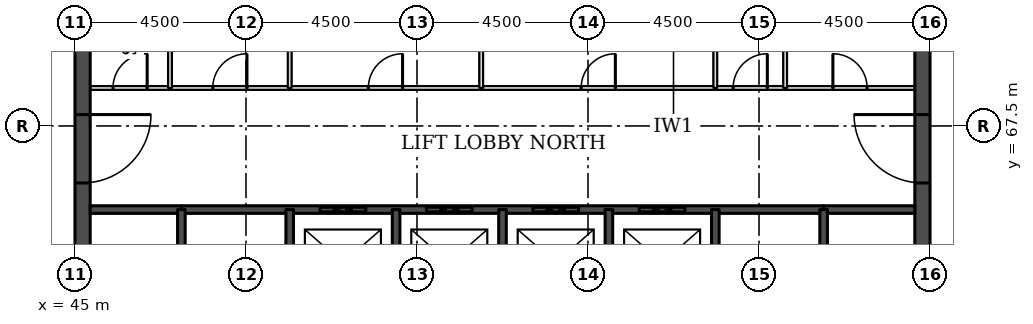
"""IFC4 building model, lengths in metres.
Left out: names, types, materials, properties, quantities, classifications, styles, units other than length and angle.
Written with IfcOpenShell. Run it as: python <this file> out.ifc"""

import sys

from ifc_helpers import new_model, si_unit, direction, frame, frame_2d, origin, place, context, subcontext, project, spatial, rectangle, extrude, element, fill, save


model = new_model("IFC4")
c1 = context("Model", 3, precision=1e-05, world=origin(), true_north=direction((0.0, 1.0)))
c2 = subcontext(c1, "Body", "Model", "MODEL_VIEW")
j1 = project(units=[si_unit("LENGTHUNIT", "METRE"), si_unit("PLANEANGLEUNIT", "RADIAN")], contexts=[c1])
p1 = place(None, origin())
s1 = spatial("IfcSite", under=j1, at=p1, CompositionType="ELEMENT")
p2 = place(p1, origin())
s2 = spatial("IfcBuilding", under=s1, at=p2, CompositionType="ELEMENT")
p3 = place(p2, frame((0.0, 0.0, 237.8)))
s3 = spatial("IfcBuildingStorey", under=s2, at=p3, CompositionType="ELEMENT", Elevation=237.8)
p4 = place(p3, frame((45.2, 49.5, 0.0), z_axis=(0.0, 0.0, 1.0), x_axis=(0.0, 1.0, 0.0)))
e1 = element("IfcWall", 1, at=p4, inside=s3, PredefinedType="SHEAR", context=c2, shape_type="SweptSolid", body=[
    extrude(rectangle(XDim=22.5, YDim=0.4, at=frame_2d((11.25, 0.0))), origin(), (0.0, 0.0, 1.0), 3.7),
])
p5 = place(p4, frame((4.2, 0.0, 0.0)))
e2 = element("IfcOpeningElement", 2, at=p5, cuts=e1, PredefinedType="OPENING", context=c2, shape_type="SweptSolid", body=[
    extrude(rectangle(XDim=1.8, YDim=2.1, at=frame_2d((0.9, 1.05))), frame((0.0, 0.21, 0.0), z_axis=(0.0, -1.0, 0.0), x_axis=(1.0, 0.0, 0.0)), (0.0, 0.0, 1.0), 0.42),
])
p6 = place(p4, frame((6.9, 0.0, 0.0)))
e3 = element("IfcOpeningElement", 3, at=p6, cuts=e1, PredefinedType="OPENING", context=c2, shape_type="SweptSolid", body=[
    extrude(rectangle(XDim=1.1, YDim=2.1, at=frame_2d((0.55, 1.05))), frame((0.0, 0.21, 0.0), z_axis=(0.0, -1.0, 0.0), x_axis=(1.0, 0.0, 0.0)), (0.0, 0.0, 1.0), 0.42),
])
p7 = place(p4, frame((13.6, 0.0, 0.0)))
e4 = element("IfcOpeningElement", 4, at=p7, cuts=e1, PredefinedType="OPENING", context=c2, shape_type="SweptSolid", body=[
    extrude(rectangle(XDim=1.1, YDim=2.1, at=frame_2d((0.55, 1.05))), frame((0.0, 0.21, 0.0), z_axis=(0.0, -1.0, 0.0), x_axis=(1.0, 0.0, 0.0)), (0.0, 0.0, 1.0), 0.42),
])
p8 = place(p4, frame((16.5, 0.0, 0.0)))
e5 = element("IfcOpeningElement", 5, at=p8, cuts=e1, PredefinedType="OPENING", context=c2, shape_type="SweptSolid", body=[
    extrude(rectangle(XDim=1.8, YDim=2.1, at=frame_2d((0.9, 1.05))), frame((0.0, 0.21, 0.0), z_axis=(0.0, -1.0, 0.0), x_axis=(1.0, 0.0, 0.0)), (0.0, 0.0, 1.0), 0.42),
])
p9 = place(p3, frame((67.3, 49.5, 0.0), z_axis=(0.0, 0.0, 1.0), x_axis=(0.0, 1.0, 0.0)))
e6 = element("IfcWall", 6, at=p9, inside=s3, PredefinedType="SHEAR", context=c2, shape_type="SweptSolid", body=[
    extrude(rectangle(XDim=22.5, YDim=0.4, at=frame_2d((11.25, 0.0))), origin(), (0.0, 0.0, 1.0), 3.7),
])
p10 = place(p9, frame((4.2, 0.0, 0.0)))
e7 = element("IfcOpeningElement", 7, at=p10, cuts=e6, PredefinedType="OPENING", context=c2, shape_type="SweptSolid", body=[
    extrude(rectangle(XDim=1.8, YDim=2.1, at=frame_2d((0.9, 1.05))), frame((0.0, 0.21, 0.0), z_axis=(0.0, -1.0, 0.0), x_axis=(1.0, 0.0, 0.0)), (0.0, 0.0, 1.0), 0.42),
])
p11 = place(p9, frame((6.9, 0.0, 0.0)))
e8 = element("IfcOpeningElement", 8, at=p11, cuts=e6, PredefinedType="OPENING", context=c2, shape_type="SweptSolid", body=[
    extrude(rectangle(XDim=1.1, YDim=2.1, at=frame_2d((0.55, 1.05))), frame((0.0, 0.21, 0.0), z_axis=(0.0, -1.0, 0.0), x_axis=(1.0, 0.0, 0.0)), (0.0, 0.0, 1.0), 0.42),
])
p12 = place(p9, frame((13.6, 0.0, 0.0)))
e9 = element("IfcOpeningElement", 9, at=p12, cuts=e6, PredefinedType="OPENING", context=c2, shape_type="SweptSolid", body=[
    extrude(rectangle(XDim=1.1, YDim=2.1, at=frame_2d((0.55, 1.05))), frame((0.0, 0.21, 0.0), z_axis=(0.0, -1.0, 0.0), x_axis=(1.0, 0.0, 0.0)), (0.0, 0.0, 1.0), 0.42),
])
p13 = place(p9, frame((16.5, 0.0, 0.0)))
e10 = element("IfcOpeningElement", 10, at=p13, cuts=e6, PredefinedType="OPENING", context=c2, shape_type="SweptSolid", body=[
    extrude(rectangle(XDim=1.8, YDim=2.1, at=frame_2d((0.9, 1.05))), frame((0.0, 0.21, 0.0), z_axis=(0.0, -1.0, 0.0), x_axis=(1.0, 0.0, 0.0)), (0.0, 0.0, 1.0), 0.42),
])
for number, where, z_axis, x_axis in (
    (11, (45.4, 65.3, 0.0), (0.0, 0.0, 1.0), (1.0, 0.0, 0.0)),
    (12, (64.7, 65.3, 0.0), (0.0, 0.0, 1.0), (1.0, 0.0, 0.0)),
):
    element("IfcWall", number, at=place(p3, frame(where, z_axis=z_axis, x_axis=x_axis)), inside=s3, PredefinedType="SOLIDWALL", context=c2, shape_type="SweptSolid", body=[
        extrude(rectangle(XDim=2.4, YDim=0.2, at=frame_2d((1.2, 0.0))), origin(), (0.0, 0.0, 1.0), 3.55),
    ])
p14 = place(p3, frame((47.8, 65.3, 0.0), z_axis=(0.0, 0.0, 1.0), x_axis=(1.0, 0.0, 0.0)))
e13 = element("IfcWall", 13, at=p14, inside=s3, PredefinedType="SOLIDWALL", context=c2, shape_type="SweptSolid", body=[
    extrude(rectangle(XDim=16.9, YDim=0.2, at=frame_2d((8.45, 0.0))), origin(), (0.0, 0.0, 1.0), 3.55),
])
p15 = place(p14, frame((3.65, 0.0, 0.0)))
e14 = element("IfcOpeningElement", 14, at=p15, cuts=e13, PredefinedType="OPENING", context=c2, shape_type="SweptSolid", body=[
    extrude(rectangle(XDim=1.2, YDim=2.1, at=frame_2d((0.6, 1.05))), frame((0.0, 0.11, 0.0), z_axis=(0.0, -1.0, 0.0), x_axis=(1.0, 0.0, 0.0)), (0.0, 0.0, 1.0), 0.22),
])
p16 = place(p14, frame((6.45, 0.0, 0.0)))
e15 = element("IfcOpeningElement", 15, at=p16, cuts=e13, PredefinedType="OPENING", context=c2, shape_type="SweptSolid", body=[
    extrude(rectangle(XDim=1.2, YDim=2.1, at=frame_2d((0.6, 1.05))), frame((0.0, 0.11, 0.0), z_axis=(0.0, -1.0, 0.0), x_axis=(1.0, 0.0, 0.0)), (0.0, 0.0, 1.0), 0.22),
])
p17 = place(p14, frame((9.25, 0.0, 0.0)))
e16 = element("IfcOpeningElement", 16, at=p17, cuts=e13, PredefinedType="OPENING", context=c2, shape_type="SweptSolid", body=[
    extrude(rectangle(XDim=1.2, YDim=2.1, at=frame_2d((0.6, 1.05))), frame((0.0, 0.11, 0.0), z_axis=(0.0, -1.0, 0.0), x_axis=(1.0, 0.0, 0.0)), (0.0, 0.0, 1.0), 0.22),
])
p18 = place(p14, frame((12.05, 0.0, 0.0)))
e17 = element("IfcOpeningElement", 17, at=p18, cuts=e13, PredefinedType="OPENING", context=c2, shape_type="SweptSolid", body=[
    extrude(rectangle(XDim=1.2, YDim=2.1, at=frame_2d((0.6, 1.05))), frame((0.0, 0.11, 0.0), z_axis=(0.0, -1.0, 0.0), x_axis=(1.0, 0.0, 0.0)), (0.0, 0.0, 1.0), 0.22),
])
p19 = place(p3, frame((45.4, 68.5, 0.0), z_axis=(0.0, 0.0, 1.0), x_axis=(1.0, 0.0, 0.0)))
e18 = element("IfcWall", 18, at=p19, inside=s3, PredefinedType="PARTITIONING", context=c2, shape_type="SweptSolid", body=[
    extrude(rectangle(XDim=21.7, YDim=0.1, at=frame_2d((10.85, 0.0))), origin(), (0.0, 0.0, 1.0), 3.55),
])
p20 = place(p19, frame((19.544, 0.0, 0.0)))
e19 = element("IfcOpeningElement", 19, at=p20, cuts=e18, PredefinedType="OPENING", context=c2, shape_type="SweptSolid", body=[
    extrude(rectangle(XDim=0.9, YDim=2.1, at=frame_2d((0.45, 1.05))), frame((0.0, 0.06, 0.0), z_axis=(0.0, -1.0, 0.0), x_axis=(1.0, 0.0, 0.0)), (0.0, 0.0, 1.0), 0.12),
])
p21 = place(p19, frame((16.919, 0.0, 0.0)))
e20 = element("IfcOpeningElement", 20, at=p21, cuts=e18, PredefinedType="OPENING", context=c2, shape_type="SweptSolid", body=[
    extrude(rectangle(XDim=0.9, YDim=2.1, at=frame_2d((0.45, 1.05))), frame((0.0, 0.06, 0.0), z_axis=(0.0, -1.0, 0.0), x_axis=(1.0, 0.0, 0.0)), (0.0, 0.0, 1.0), 0.12),
])
p22 = place(p19, frame((0.6, 0.0, 0.0)))
e21 = element("IfcOpeningElement", 21, at=p22, cuts=e18, PredefinedType="OPENING", context=c2, shape_type="SweptSolid", body=[
    extrude(rectangle(XDim=0.9, YDim=2.1, at=frame_2d((0.45, 1.05))), frame((0.0, 0.06, 0.0), z_axis=(0.0, -1.0, 0.0), x_axis=(1.0, 0.0, 0.0)), (0.0, 0.0, 1.0), 0.12),
])
p23 = place(p19, frame((3.225, 0.0, 0.0)))
e22 = element("IfcOpeningElement", 22, at=p23, cuts=e18, PredefinedType="OPENING", context=c2, shape_type="SweptSolid", body=[
    extrude(rectangle(XDim=0.9, YDim=2.1, at=frame_2d((0.45, 1.05))), frame((0.0, 0.06, 0.0), z_axis=(0.0, -1.0, 0.0), x_axis=(1.0, 0.0, 0.0)), (0.0, 0.0, 1.0), 0.12),
])
p24 = place(p19, frame((12.92, 0.0, 0.0)))
e23 = element("IfcOpeningElement", 23, at=p24, cuts=e18, PredefinedType="OPENING", context=c2, shape_type="SweptSolid", body=[
    extrude(rectangle(XDim=0.9, YDim=2.1, at=frame_2d((0.45, 1.05))), frame((0.0, 0.06, 0.0), z_axis=(0.0, -1.0, 0.0), x_axis=(1.0, 0.0, 0.0)), (0.0, 0.0, 1.0), 0.12),
])
p25 = place(p19, frame((7.32, 0.0, 0.0)))
e24 = element("IfcOpeningElement", 24, at=p25, cuts=e18, PredefinedType="OPENING", context=c2, shape_type="SweptSolid", body=[
    extrude(rectangle(XDim=0.9, YDim=2.1, at=frame_2d((0.45, 1.05))), frame((0.0, 0.06, 0.0), z_axis=(0.0, -1.0, 0.0), x_axis=(1.0, 0.0, 0.0)), (0.0, 0.0, 1.0), 0.12),
])
p26 = place(p3, frame((47.5, 68.5, 0.0), z_axis=(0.0, 0.0, 1.0), x_axis=(0.0, 1.0, 0.0)))
e25 = element("IfcWall", 25, at=p26, inside=s3, PredefinedType="PARTITIONING", context=c2, shape_type="SweptSolid", body=[
    extrude(rectangle(XDim=3.1, YDim=0.1, at=frame_2d((1.55, 0.0))), origin(), (0.0, 0.0, 1.0), 3.55),
])
p27 = place(p3, frame((47.8, 62.0, 0.0), z_axis=(0.0, 0.0, 1.0), x_axis=(0.0, 1.0, 0.0)))
e26 = element("IfcWall", 26, at=p27, inside=s3, PredefinedType="SOLIDWALL", context=c2, shape_type="SweptSolid", body=[
    extrude(rectangle(XDim=3.3, YDim=0.2, at=frame_2d((1.65, 0.0))), origin(), (0.0, 0.0, 1.0), 3.55),
])
p28 = place(p27, frame((1.1, 0.0, 0.0)))
e27 = element("IfcOpeningElement", 27, at=p28, cuts=e26, PredefinedType="OPENING", context=c2, shape_type="SweptSolid", body=[
    extrude(rectangle(XDim=1.1, YDim=2.1, at=frame_2d((0.55, 1.05))), frame((0.0, 0.11, 0.0), z_axis=(0.0, -1.0, 0.0), x_axis=(1.0, 0.0, 0.0)), (0.0, 0.0, 1.0), 0.22),
])
p29 = place(p3, frame((50.65, 68.5, 0.0), z_axis=(0.0, 0.0, 1.0), x_axis=(0.0, 1.0, 0.0)))
e28 = element("IfcWall", 28, at=p29, inside=s3, PredefinedType="PARTITIONING", context=c2, shape_type="SweptSolid", body=[
    extrude(rectangle(XDim=3.1, YDim=0.1, at=frame_2d((1.55, 0.0))), origin(), (0.0, 0.0, 1.0), 3.55),
])
p30 = place(p3, frame((50.65, 62.0, 0.0), z_axis=(0.0, 0.0, 1.0), x_axis=(0.0, 1.0, 0.0)))
e29 = element("IfcWall", 29, at=p30, inside=s3, PredefinedType="SOLIDWALL", context=c2, shape_type="SweptSolid", body=[
    extrude(rectangle(XDim=3.3, YDim=0.2, at=frame_2d((1.65, 0.0))), origin(), (0.0, 0.0, 1.0), 3.55),
])
p31 = place(p3, frame((53.45, 62.5, 0.0), z_axis=(0.0, 0.0, 1.0), x_axis=(0.0, 1.0, 0.0)))
e30 = element("IfcWall", 30, at=p31, inside=s3, PredefinedType="SOLIDWALL", context=c2, shape_type="SweptSolid", body=[
    extrude(rectangle(XDim=2.8, YDim=0.2, at=frame_2d((1.4, 0.0))), origin(), (0.0, 0.0, 1.0), 3.55),
])
p32 = place(p3, frame((55.69, 68.5, 0.0), z_axis=(0.0, 0.0, 1.0), x_axis=(0.0, 1.0, 0.0)))
e31 = element("IfcWall", 31, at=p32, inside=s3, PredefinedType="PARTITIONING", context=c2, shape_type="SweptSolid", body=[
    extrude(rectangle(XDim=3.1, YDim=0.1, at=frame_2d((1.55, 0.0))), origin(), (0.0, 0.0, 1.0), 3.55),
])
for number, where, z_axis, x_axis in (
    (32, (56.25, 62.5, 0.0), (0.0, 0.0, 1.0), (0.0, 1.0, 0.0)),
    (33, (59.05, 62.5, 0.0), (0.0, 0.0, 1.0), (0.0, 1.0, 0.0)),
):
    element("IfcWall", number, at=place(p3, frame(where, z_axis=z_axis, x_axis=x_axis)), inside=s3, PredefinedType="SOLIDWALL", context=c2, shape_type="SweptSolid", body=[
        extrude(rectangle(XDim=2.8, YDim=0.2, at=frame_2d((1.4, 0.0))), origin(), (0.0, 0.0, 1.0), 3.55),
    ])
p33 = place(p3, frame((61.85, 68.5, 0.0), z_axis=(0.0, 0.0, 1.0), x_axis=(0.0, 1.0, 0.0)))
e34 = element("IfcWall", 34, at=p33, inside=s3, PredefinedType="PARTITIONING", context=c2, shape_type="SweptSolid", body=[
    extrude(rectangle(XDim=3.1, YDim=0.1, at=frame_2d((1.55, 0.0))), origin(), (0.0, 0.0, 1.0), 3.55),
])
p34 = place(p3, frame((61.85, 62.0, 0.0), z_axis=(0.0, 0.0, 1.0), x_axis=(0.0, 1.0, 0.0)))
e35 = element("IfcWall", 35, at=p34, inside=s3, PredefinedType="SOLIDWALL", context=c2, shape_type="SweptSolid", body=[
    extrude(rectangle(XDim=3.3, YDim=0.2, at=frame_2d((1.65, 0.0))), origin(), (0.0, 0.0, 1.0), 3.55),
])
p35 = place(p3, frame((63.688, 68.5, 0.0), z_axis=(0.0, 0.0, 1.0), x_axis=(0.0, 1.0, 0.0)))
e36 = element("IfcWall", 36, at=p35, inside=s3, PredefinedType="PARTITIONING", context=c2, shape_type="SweptSolid", body=[
    extrude(rectangle(XDim=3.1, YDim=0.1, at=frame_2d((1.55, 0.0))), origin(), (0.0, 0.0, 1.0), 3.55),
])
p36 = place(p3, frame((64.7, 62.0, 0.0), z_axis=(0.0, 0.0, 1.0), x_axis=(0.0, 1.0, 0.0)))
e37 = element("IfcWall", 37, at=p36, inside=s3, PredefinedType="SOLIDWALL", context=c2, shape_type="SweptSolid", body=[
    extrude(rectangle(XDim=3.3, YDim=0.2, at=frame_2d((1.65, 0.0))), origin(), (0.0, 0.0, 1.0), 3.55),
])
p37 = place(p36, frame((1.1, 0.0, 0.0)))
e38 = element("IfcOpeningElement", 38, at=p37, cuts=e37, PredefinedType="OPENING", context=c2, shape_type="SweptSolid", body=[
    extrude(rectangle(XDim=1.1, YDim=2.1, at=frame_2d((0.55, 1.05))), frame((0.0, 0.11, 0.0), z_axis=(0.0, -1.0, 0.0), x_axis=(1.0, 0.0, 0.0)), (0.0, 0.0, 1.0), 0.22),
])
p38 = place(p15, origin())
e39 = element("IfcDoor", 39, at=p38, inside=s3, OperationType="DOUBLE_DOOR_SLIDING", PredefinedType="DOOR", context=c2, shape_type="SweptSolid", body=[
    extrude(rectangle(XDim=1.2, YDim=2.1, at=frame_2d((0.6, 1.05))), frame((0.0, 0.025, 0.0), z_axis=(0.0, -1.0, 0.0), x_axis=(1.0, 0.0, 0.0)), (0.0, 0.0, 1.0), 0.05),
])
fill(e14, e39)
p39 = place(p16, origin())
e40 = element("IfcDoor", 40, at=p39, inside=s3, OperationType="DOUBLE_DOOR_SLIDING", PredefinedType="DOOR", context=c2, shape_type="SweptSolid", body=[
    extrude(rectangle(XDim=1.2, YDim=2.1, at=frame_2d((0.6, 1.05))), frame((0.0, 0.025, 0.0), z_axis=(0.0, -1.0, 0.0), x_axis=(1.0, 0.0, 0.0)), (0.0, 0.0, 1.0), 0.05),
])
fill(e15, e40)
p40 = place(p17, origin())
e41 = element("IfcDoor", 41, at=p40, inside=s3, OperationType="DOUBLE_DOOR_SLIDING", PredefinedType="DOOR", context=c2, shape_type="SweptSolid", body=[
    extrude(rectangle(XDim=1.2, YDim=2.1, at=frame_2d((0.6, 1.05))), frame((0.0, 0.025, 0.0), z_axis=(0.0, -1.0, 0.0), x_axis=(1.0, 0.0, 0.0)), (0.0, 0.0, 1.0), 0.05),
])
fill(e16, e41)
p41 = place(p18, origin())
e42 = element("IfcDoor", 42, at=p41, inside=s3, OperationType="DOUBLE_DOOR_SLIDING", PredefinedType="DOOR", context=c2, shape_type="SweptSolid", body=[
    extrude(rectangle(XDim=1.2, YDim=2.1, at=frame_2d((0.6, 1.05))), frame((0.0, 0.025, 0.0), z_axis=(0.0, -1.0, 0.0), x_axis=(1.0, 0.0, 0.0)), (0.0, 0.0, 1.0), 0.05),
])
fill(e17, e42)
p42 = place(p8, frame((1.8, 0.0, 0.0), z_axis=(0.0, 0.0, 1.0), x_axis=(-1.0, 0.0, 0.0)))
e43 = element("IfcDoor", 43, at=p42, inside=s3, OperationType="SINGLE_SWING_LEFT", PredefinedType="DOOR", context=c2, shape_type="SweptSolid", body=[
    extrude(rectangle(XDim=1.8, YDim=2.1, at=frame_2d((0.9, 1.05))), frame((0.0, 0.025, 0.0), z_axis=(0.0, -1.0, 0.0), x_axis=(1.0, 0.0, 0.0)), (0.0, 0.0, 1.0), 0.05),
])
fill(e5, e43)
p43 = place(p13, origin())
e44 = element("IfcDoor", 44, at=p43, inside=s3, OperationType="SINGLE_SWING_RIGHT", PredefinedType="DOOR", context=c2, shape_type="SweptSolid", body=[
    extrude(rectangle(XDim=1.8, YDim=2.1, at=frame_2d((0.9, 1.05))), frame((0.0, 0.025, 0.0), z_axis=(0.0, -1.0, 0.0), x_axis=(1.0, 0.0, 0.0)), (0.0, 0.0, 1.0), 0.05),
])
fill(e10, e44)
p44 = place(p20, origin())
e45 = element("IfcDoor", 45, at=p44, inside=s3, OperationType="SINGLE_SWING_LEFT", PredefinedType="DOOR", context=c2, shape_type="SweptSolid", body=[
    extrude(rectangle(XDim=0.9, YDim=2.1, at=frame_2d((0.45, 1.05))), frame((0.0, 0.025, 0.0), z_axis=(0.0, -1.0, 0.0), x_axis=(1.0, 0.0, 0.0)), (0.0, 0.0, 1.0), 0.05),
])
fill(e19, e45)
p45 = place(p21, origin())
e46 = element("IfcDoor", 46, at=p45, inside=s3, OperationType="SINGLE_SWING_RIGHT", PredefinedType="DOOR", context=c2, shape_type="SweptSolid", body=[
    extrude(rectangle(XDim=0.9, YDim=2.1, at=frame_2d((0.45, 1.05))), frame((0.0, 0.025, 0.0), z_axis=(0.0, -1.0, 0.0), x_axis=(1.0, 0.0, 0.0)), (0.0, 0.0, 1.0), 0.05),
])
fill(e20, e46)
p46 = place(p22, origin())
e47 = element("IfcDoor", 47, at=p46, inside=s3, OperationType="SINGLE_SWING_RIGHT", PredefinedType="DOOR", context=c2, shape_type="SweptSolid", body=[
    extrude(rectangle(XDim=0.9, YDim=2.1, at=frame_2d((0.45, 1.05))), frame((0.0, 0.025, 0.0), z_axis=(0.0, -1.0, 0.0), x_axis=(1.0, 0.0, 0.0)), (0.0, 0.0, 1.0), 0.05),
])
fill(e21, e47)
p47 = place(p23, origin())
e48 = element("IfcDoor", 48, at=p47, inside=s3, OperationType="SINGLE_SWING_RIGHT", PredefinedType="DOOR", context=c2, shape_type="SweptSolid", body=[
    extrude(rectangle(XDim=0.9, YDim=2.1, at=frame_2d((0.45, 1.05))), frame((0.0, 0.025, 0.0), z_axis=(0.0, -1.0, 0.0), x_axis=(1.0, 0.0, 0.0)), (0.0, 0.0, 1.0), 0.05),
])
fill(e22, e48)
p48 = place(p24, origin())
e49 = element("IfcDoor", 49, at=p48, inside=s3, OperationType="SINGLE_SWING_RIGHT", PredefinedType="DOOR", context=c2, shape_type="SweptSolid", body=[
    extrude(rectangle(XDim=0.9, YDim=2.1, at=frame_2d((0.45, 1.05))), frame((0.0, 0.025, 0.0), z_axis=(0.0, -1.0, 0.0), x_axis=(1.0, 0.0, 0.0)), (0.0, 0.0, 1.0), 0.05),
])
fill(e23, e49)
p49 = place(p25, origin())
e50 = element("IfcDoor", 50, at=p49, inside=s3, OperationType="SINGLE_SWING_RIGHT", PredefinedType="DOOR", context=c2, shape_type="SweptSolid", body=[
    extrude(rectangle(XDim=0.9, YDim=2.1, at=frame_2d((0.45, 1.05))), frame((0.0, 0.025, 0.0), z_axis=(0.0, -1.0, 0.0), x_axis=(1.0, 0.0, 0.0)), (0.0, 0.0, 1.0), 0.05),
])
fill(e24, e50)
save(model, sys.argv[1])
